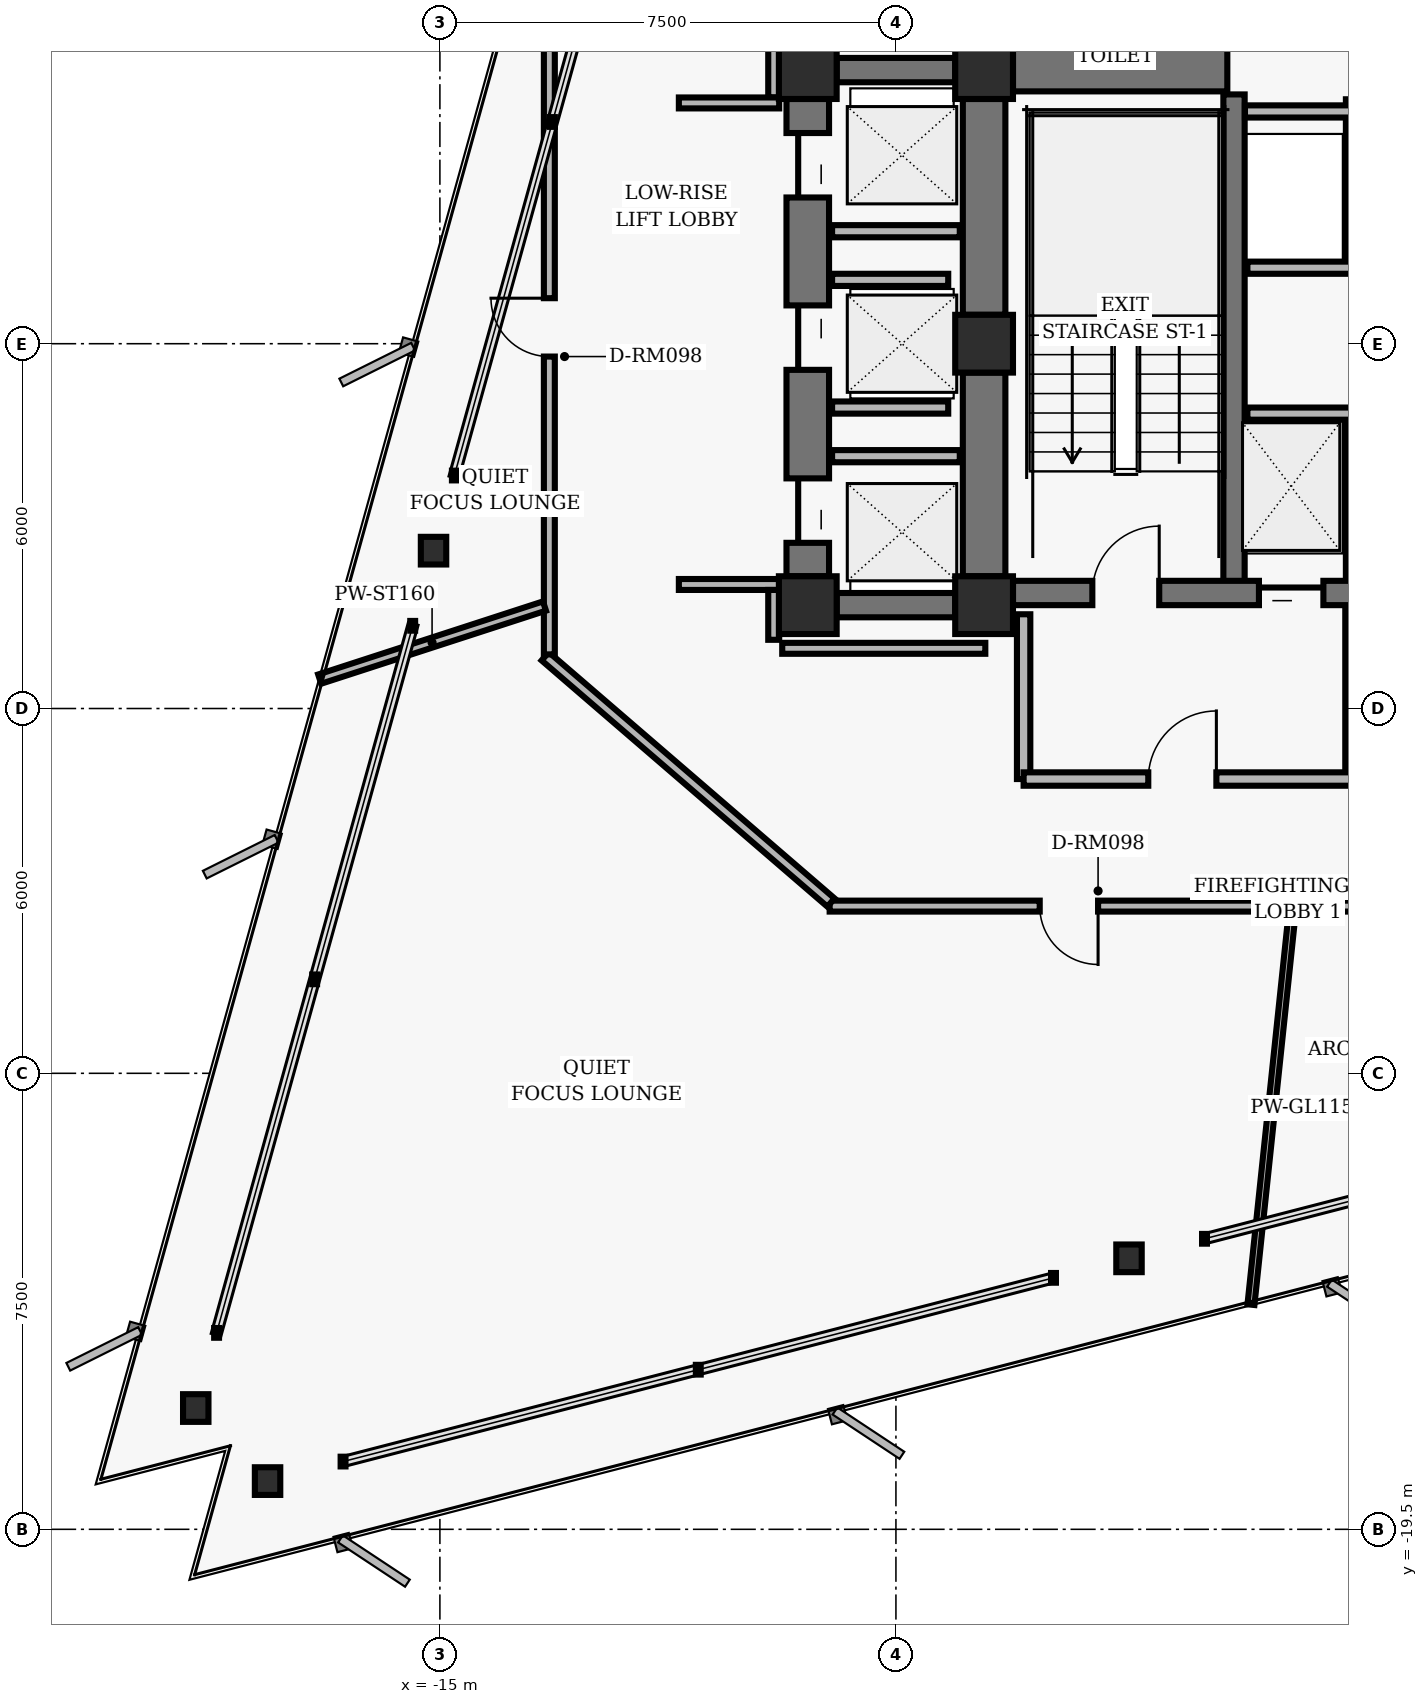
"""IFC4 building model, lengths in metres.
Left out: names, types, materials, properties, quantities, classifications, styles, units other than length and angle.
Written with IfcOpenShell. Run it as: python <this file> out.ifc"""

import sys

from ifc_helpers import new_model, si_unit, direction, frame, frame_2d, origin, origin_2d, place, context, subcontext, project, spatial, rectangle, hollow_rectangle, i_section, extrude, element, fill, save


model = new_model("IFC4")
c1 = context("Model", 3, precision=1e-05, world=origin(), true_north=direction((0.0, 1.0)))
c2 = subcontext(c1, "Body", "Model", "MODEL_VIEW")
j1 = project(units=[si_unit("LENGTHUNIT", "METRE"), si_unit("PLANEANGLEUNIT", "RADIAN")], contexts=[c1])
p1 = place(None, origin())
s1 = spatial("IfcSite", under=j1, at=p1, CompositionType="ELEMENT")
p2 = place(p1, origin())
s2 = spatial("IfcBuilding", under=s1, at=p2, CompositionType="ELEMENT")
p3 = place(p2, frame((0.0, 0.0, 85.6)))
s3 = spatial("IfcBuildingStorey", under=s2, at=p3, CompositionType="ELEMENT", Elevation=85.6)
for number, where, z_axis, x_axis in (
    (1, (-6.05, 4.5, 0.0), (0.0, 0.0, 1.0), (1.0, 0.0, 0.0)),
    (2, (-6.05, 0.0, 0.0), (0.0, 0.0, 1.0), (1.0, 0.0, 0.0)),
    (3, (-6.05, -4.3, 0.0), (0.0, 0.0, 1.0), (1.0, 0.0, 0.0)),
    (4, (-8.95, 4.5, 0.0), (0.0, 0.0, 1.0), (1.0, 0.0, 0.0)),
    (5, (-8.95, -4.3, 0.0), (0.0, 0.0, 1.0), (1.0, 0.0, 0.0)),
):
    element("IfcColumn", number, at=place(p3, frame(where, z_axis=z_axis, x_axis=x_axis)), inside=s3, PredefinedType="COLUMN", context=c2, shape_type="SweptSolid", body=[
        extrude(hollow_rectangle(XDim=0.95, YDim=0.95, WallThickness=0.06, InnerFilletRadius=0.02, OuterFilletRadius=0.04, at=origin_2d()), origin(), (0.0, 0.0, 1.0), 3.04),
    ])
p4 = place(p3, frame((-6.05, 0.475, 0.0), z_axis=(0.0, 0.0, 1.0), x_axis=(0.0, 1.0, 0.0)))
e6 = element("IfcWall", 6, at=p4, inside=s3, PredefinedType="SHEAR", context=c2, shape_type="SweptSolid", body=[
    extrude(rectangle(XDim=3.55, YDim=0.7, at=frame_2d((1.775, 0.0))), origin(), (0.0, 0.0, 1.0), 2.788),
])
p5 = place(p3, frame((-6.05, -3.825, 0.0), z_axis=(0.0, 0.0, 1.0), x_axis=(0.0, 1.0, 0.0)))
e7 = element("IfcWall", 7, at=p5, inside=s3, PredefinedType="SHEAR", context=c2, shape_type="SweptSolid", body=[
    extrude(rectangle(XDim=3.35, YDim=0.7, at=frame_2d((1.675, 0.0))), origin(), (0.0, 0.0, 1.0), 2.788),
])
p6 = place(p3, frame((-1.94, -4.1, 0.0), z_axis=(0.0, 0.0, 1.0), x_axis=(0.0, 1.0, 0.0)))
e8 = element("IfcWall", 8, at=p6, inside=s3, PredefinedType="SHEAR", context=c2, shape_type="SweptSolid", body=[
    extrude(rectangle(XDim=8.2, YDim=0.35, at=frame_2d((4.1, 0.0))), origin(), (0.0, 0.0, 1.0), 2.788),
])
p7 = place(p3, frame((-5.575, -4.1, 0.0), z_axis=(0.0, 0.0, 1.0), x_axis=(1.0, 0.0, 0.0)))
e9 = element("IfcWall", 9, at=p7, inside=s3, PredefinedType="SHEAR", context=c2, shape_type="SweptSolid", body=[
    extrude(rectangle(XDim=11.15, YDim=0.4, at=frame_2d((5.575, 0.0))), origin(), (0.0, 0.0, 1.0), 2.788),
])
p8 = place(p7, frame((1.305, 0.0, 0.0)))
e10 = element("IfcOpeningElement", 10, at=p8, cuts=e9, PredefinedType="OPENING", context=c2, shape_type="SweptSolid", body=[
    extrude(rectangle(XDim=1.1, YDim=2.04, at=frame_2d((0.55, 1.02))), frame((0.0, 0.21, 0.0), z_axis=(0.0, -1.0, 0.0), x_axis=(1.0, 0.0, 0.0)), (0.0, 0.0, 1.0), 0.42),
])
p9 = place(p7, frame((8.745, 0.0, 0.0)))
e11 = element("IfcOpeningElement", 11, at=p9, cuts=e9, PredefinedType="OPENING", context=c2, shape_type="SweptSolid", body=[
    extrude(rectangle(XDim=1.1, YDim=2.04, at=frame_2d((0.55, 1.02))), frame((0.0, 0.21, 0.0), z_axis=(0.0, -1.0, 0.0), x_axis=(1.0, 0.0, 0.0)), (0.0, 0.0, 1.0), 0.42),
])
p10 = place(p7, frame((4.045, 0.0, 0.0)))
e12 = element("IfcOpeningElement", 12, at=p10, cuts=e9, PredefinedType="OPENING", context=c2, shape_type="SweptSolid", body=[
    extrude(rectangle(XDim=1.06, YDim=2.04, at=frame_2d((0.53, 1.02))), frame((0.0, 0.21, 0.0), z_axis=(0.0, -1.0, 0.0), x_axis=(1.0, 0.0, 0.0)), (0.0, 0.0, 1.0), 0.42),
])
p11 = place(p7, frame((6.045, 0.0, 0.0)))
e13 = element("IfcOpeningElement", 13, at=p11, cuts=e9, PredefinedType="OPENING", context=c2, shape_type="SweptSolid", body=[
    extrude(rectangle(XDim=1.06, YDim=2.04, at=frame_2d((0.53, 1.02))), frame((0.0, 0.21, 0.0), z_axis=(0.0, -1.0, 0.0), x_axis=(1.0, 0.0, 0.0)), (0.0, 0.0, 1.0), 0.42),
])
p12 = place(p3, frame((-5.575, 4.5, 0.0), z_axis=(0.0, 0.0, 1.0), x_axis=(1.0, 0.0, 0.0)))
e14 = element("IfcWall", 14, at=p12, inside=s3, PredefinedType="SHEAR", context=c2, shape_type="SweptSolid", body=[
    extrude(rectangle(XDim=3.525, YDim=0.7, at=frame_2d((1.762, 0.0))), origin(), (0.0, 0.0, 1.0), 2.788),
])
p13 = place(p3, frame((-8.95, -3.825, 0.0), z_axis=(0.0, 0.0, 1.0), x_axis=(0.0, 1.0, 0.0)))
e15 = element("IfcWall", 15, at=p13, inside=s3, PredefinedType="SHEAR", context=c2, shape_type="SweptSolid", body=[
    extrude(rectangle(XDim=7.85, YDim=0.7, at=frame_2d((3.925, 0.0))), origin(), (0.0, 0.0, 1.0), 2.788),
])
p14 = place(p13, frame((0.55, 0.0, 0.0)))
e16 = element("IfcOpeningElement", 16, at=p14, cuts=e15, PredefinedType="OPENING", context=c2, shape_type="SweptSolid", body=[
    extrude(rectangle(XDim=1.06, YDim=2.04, at=frame_2d((0.53, 1.02))), frame((0.0, 0.36, 0.0), z_axis=(0.0, -1.0, 0.0), x_axis=(1.0, 0.0, 0.0)), (0.0, 0.0, 1.0), 0.72),
])
p15 = place(p13, frame((3.395, 0.0, 0.0)))
e17 = element("IfcOpeningElement", 17, at=p15, cuts=e15, PredefinedType="OPENING", context=c2, shape_type="SweptSolid", body=[
    extrude(rectangle(XDim=1.06, YDim=2.04, at=frame_2d((0.53, 1.02))), frame((0.0, 0.36, 0.0), z_axis=(0.0, -1.0, 0.0), x_axis=(1.0, 0.0, 0.0)), (0.0, 0.0, 1.0), 0.72),
])
p16 = place(p13, frame((6.23, 0.0, 0.0)))
e18 = element("IfcOpeningElement", 18, at=p16, cuts=e15, PredefinedType="OPENING", context=c2, shape_type="SweptSolid", body=[
    extrude(rectangle(XDim=1.06, YDim=2.04, at=frame_2d((0.53, 1.02))), frame((0.0, 0.36, 0.0), z_axis=(0.0, -1.0, 0.0), x_axis=(1.0, 0.0, 0.0)), (0.0, 0.0, 1.0), 0.72),
])
for number, where, z_axis, x_axis in (
    (19, (-8.475, 4.5, 0.0), (0.0, 0.0, 1.0), (1.0, 0.0, 0.0)),
    (20, (-8.475, -4.3, 0.0), (0.0, 0.0, 1.0), (1.0, 0.0, 0.0)),
):
    element("IfcWall", number, at=place(p3, frame(where, z_axis=z_axis, x_axis=x_axis)), inside=s3, PredefinedType="SHEAR", context=c2, shape_type="SweptSolid", body=[
        extrude(rectangle(XDim=1.95, YDim=0.4, at=frame_2d((0.975, 0.0))), origin(), (0.0, 0.0, 1.0), 2.788),
    ])
for number, where, z_axis, x_axis in (
    (21, (-15.104, -3.404, 0.0), (0.0, 0.0, 1.0), (1.0, 0.0, 0.0)),
    (22, (-19.015, -17.505, 0.0), (0.0, 0.0, 1.0), (1.0, 0.0, 0.0)),
    (23, (-17.834, -18.707, 0.0), (0.0, 0.0, 1.0), (1.0, 0.0, 0.0)),
    (24, (-3.667, -15.043, 0.0), (0.0, 0.0, 1.0), (1.0, 0.0, 0.0)),
):
    element("IfcColumn", number, at=place(p3, frame(where, z_axis=z_axis, x_axis=x_axis)), inside=s3, PredefinedType="COLUMN", context=c2, shape_type="SweptSolid", body=[
        extrude(i_section(OverallWidth=0.418, OverallDepth=0.455, WebThickness=0.042, FlangeThickness=0.068, FilletRadius=0.025, at=origin_2d()), origin(), (0.0, 0.0, 1.0), 3.04),
    ])
p17 = place(p3, frame((0.0, -3.82, 0.0), z_axis=(0.0, 0.0, 1.0), x_axis=(0.0, 1.0, 0.0)))
e25 = element("IfcWall", 25, at=p17, inside=s3, PredefinedType="PARTITIONING", context=c2, shape_type="SweptSolid", body=[
    extrude(rectangle(XDim=2.67, YDim=0.2, at=frame_2d((1.335, 0.0))), origin(), (0.0, 0.0, 1.0), 2.763),
])
p18 = place(p3, frame((-1.72, -1.15, 0.0), z_axis=(0.0, 0.0, 1.0), x_axis=(1.0, 0.0, 0.0)))
e26 = element("IfcWall", 26, at=p18, inside=s3, PredefinedType="PARTITIONING", context=c2, shape_type="SweptSolid", body=[
    extrude(rectangle(XDim=3.44, YDim=0.2, at=frame_2d((1.72, 0.0))), origin(), (0.0, 0.0, 1.0), 2.763),
])
p19 = place(p3, frame((-5.4, -7.16, 0.0), z_axis=(0.0, 0.0, 1.0), x_axis=(0.0, 1.0, 0.0)))
e27 = element("IfcWall", 27, at=p19, inside=s3, PredefinedType="PARTITIONING", context=c2, shape_type="SweptSolid", body=[
    extrude(rectangle(XDim=2.71, YDim=0.22, at=frame_2d((1.355, 0.0))), origin(), (0.0, 0.0, 1.0), 2.763),
])
p20 = place(p3, frame((0.0, -7.16, 0.0), z_axis=(0.0, 0.0, 1.0), x_axis=(0.0, 1.0, 0.0)))
e28 = element("IfcWall", 28, at=p20, inside=s3, PredefinedType="PARTITIONING", context=c2, shape_type="SweptSolid", body=[
    extrude(rectangle(XDim=2.81, YDim=0.22, at=frame_2d((1.405, 0.0))), origin(), (0.0, 0.0, 1.0), 2.763),
])
p21 = place(p3, frame((-5.4, -7.16, 0.0), z_axis=(0.0, 0.0, 1.0), x_axis=(1.0, 0.0, 0.0)))
e29 = element("IfcWall", 29, at=p21, inside=s3, PredefinedType="PARTITIONING", context=c2, shape_type="SweptSolid", body=[
    extrude(rectangle(XDim=5.4, YDim=0.22, at=frame_2d((2.7, 0.0))), origin(), (0.0, 0.0, 1.0), 2.763),
])
p22 = place(p21, frame((2.05, 0.0, 0.0)))
e30 = element("IfcOpeningElement", 30, at=p22, cuts=e29, PredefinedType="OPENING", context=c2, shape_type="SweptSolid", body=[
    extrude(rectangle(XDim=1.12, YDim=2.02, at=frame_2d((0.56, 1.01))), frame((0.0, 0.12, 0.0), z_axis=(0.0, -1.0, 0.0), x_axis=(1.0, 0.0, 0.0)), (0.0, 0.0, 1.0), 0.24),
])
p23 = place(p3, frame((0.0, 1.25, 0.0), z_axis=(0.0, 0.0, 1.0), x_axis=(0.0, 1.0, 0.0)))
e31 = element("IfcWall", 31, at=p23, inside=s3, PredefinedType="PARTITIONING", context=c2, shape_type="SweptSolid", body=[
    extrude(rectangle(XDim=2.77, YDim=0.2, at=frame_2d((1.385, 0.0))), origin(), (0.0, 0.0, 1.0), 2.763),
])
p24 = place(p3, frame((-1.72, 1.25, 0.0), z_axis=(0.0, 0.0, 1.0), x_axis=(1.0, 0.0, 0.0)))
e32 = element("IfcWall", 32, at=p24, inside=s3, PredefinedType="PARTITIONING", context=c2, shape_type="SweptSolid", body=[
    extrude(rectangle(XDim=3.44, YDim=0.2, at=frame_2d((1.72, 0.0))), origin(), (0.0, 0.0, 1.0), 2.763),
])
p25 = place(p3, frame((-1.76, 3.82, 0.0), z_axis=(0.0, 0.0, 1.0), x_axis=(1.0, 0.0, 0.0)))
e33 = element("IfcWall", 33, at=p25, inside=s3, PredefinedType="PARTITIONING", context=c2, shape_type="SweptSolid", body=[
    extrude(rectangle(XDim=3.52, YDim=0.2, at=frame_2d((1.76, 0.0))), origin(), (0.0, 0.0, 1.0), 2.763),
])
for number, where, z_axis, x_axis in (
    (34, (-8.55, -1.85, 0.0), (0.0, 0.0, 1.0), (1.0, 0.0, 0.0)),
    (35, (-8.55, 1.85, 0.0), (0.0, 0.0, 1.0), (1.0, 0.0, 0.0)),
):
    element("IfcWall", number, at=place(p3, frame(where, z_axis=z_axis, x_axis=x_axis)), inside=s3, PredefinedType="PARTITIONING", context=c2, shape_type="SweptSolid", body=[
        extrude(rectangle(XDim=2.1, YDim=0.2, at=frame_2d((1.05, 0.0))), origin(), (0.0, 0.0, 1.0), 2.763),
    ])
for number, where, z_axis, x_axis in (
    (36, (-8.55, -1.05, 0.0), (0.0, 0.0, 1.0), (1.0, 0.0, 0.0)),
    (37, (-8.55, 1.05, 0.0), (0.0, 0.0, 1.0), (1.0, 0.0, 0.0)),
):
    element("IfcWall", number, at=place(p3, frame(where, z_axis=z_axis, x_axis=x_axis)), inside=s3, PredefinedType="PARTITIONING", context=c2, shape_type="SweptSolid", body=[
        extrude(rectangle(XDim=1.91, YDim=0.2, at=frame_2d((0.955, 0.0))), origin(), (0.0, 0.0, 1.0), 2.763),
    ])
p26 = place(p3, frame((8.41, -9.25, 0.0), z_axis=(0.0, 0.0, 1.0), x_axis=(-1.0, 0.0, 0.0)))
e38 = element("IfcWall", 38, at=p26, inside=s3, PredefinedType="PARTITIONING", context=c2, shape_type="SweptSolid", body=[
    extrude(rectangle(XDim=17.0, YDim=0.18, at=frame_2d((8.5, 0.0))), origin(), (0.0, 0.0, 1.0), 2.277),
])
p27 = place(p26, frame((12.585, 0.0, 0.0)))
e39 = element("IfcOpeningElement", 39, at=p27, cuts=e38, PredefinedType="OPENING", context=c2, shape_type="SweptSolid", body=[
    extrude(rectangle(XDim=0.96, YDim=2.02, at=frame_2d((0.48, 1.01))), frame((0.0, 0.1, 0.0), z_axis=(0.0, -1.0, 0.0), x_axis=(1.0, 0.0, 0.0)), (0.0, 0.0, 1.0), 0.2),
])
p28 = place(p26, frame((4.345, 0.0, 0.0)))
e40 = element("IfcOpeningElement", 40, at=p28, cuts=e38, PredefinedType="OPENING", context=c2, shape_type="SweptSolid", body=[
    extrude(rectangle(XDim=0.96, YDim=2.02, at=frame_2d((0.48, 1.01))), frame((0.0, 0.1, 0.0), z_axis=(0.0, -1.0, 0.0), x_axis=(1.0, 0.0, 0.0)), (0.0, 0.0, 1.0), 0.2),
])
p29 = place(p3, frame((-8.568, -9.191, 0.0), z_axis=(0.0, 0.0, 1.0), x_axis=(-0.757556899173, 0.652769135694, 0.0)))
e41 = element("IfcWall", 41, at=p29, inside=s3, PredefinedType="PARTITIONING", context=c2, shape_type="SweptSolid", body=[
    extrude(rectangle(XDim=6.204, YDim=0.18, at=frame_2d((3.102, 0.0))), origin(), (0.0, 0.0, 1.0), 2.763),
])
p30 = place(p3, frame((-13.2, -5.11, 0.0), z_axis=(0.0, 0.0, 1.0), x_axis=(0.0, 1.0, 0.0)))
e42 = element("IfcWall", 42, at=p30, inside=s3, PredefinedType="PARTITIONING", context=c2, shape_type="SweptSolid", body=[
    extrude(rectangle(XDim=10.22, YDim=0.18, at=frame_2d((5.11, 0.0))), origin(), (0.0, 0.0, 1.0), 2.143),
])
p31 = place(p30, frame((4.899, 0.0, 0.0)))
e43 = element("IfcOpeningElement", 43, at=p31, cuts=e42, PredefinedType="OPENING", context=c2, shape_type="SweptSolid", body=[
    extrude(rectangle(XDim=0.96, YDim=2.02, at=frame_2d((0.48, 1.01))), frame((0.0, 0.1, 0.0), z_axis=(0.0, -1.0, 0.0), x_axis=(1.0, 0.0, 0.0)), (0.0, 0.0, 1.0), 0.2),
])
p32 = place(p3, frame((-9.51, 4.87, 0.0), z_axis=(0.0, 0.0, 1.0), x_axis=(0.0, -1.0, 0.0)))
e44 = element("IfcWall", 44, at=p32, inside=s3, PredefinedType="PARTITIONING", context=c2, shape_type="SweptSolid", body=[
    extrude(rectangle(XDim=0.82, YDim=0.18, at=frame_2d((0.41, 0.0))), origin(), (0.0, 0.0, 1.0), 2.277),
])
p33 = place(p3, frame((-9.42, 3.96, 0.0), z_axis=(0.0, 0.0, 1.0), x_axis=(-1.0, 0.0, 0.0)))
e45 = element("IfcWall", 45, at=p33, inside=s3, PredefinedType="PARTITIONING", context=c2, shape_type="SweptSolid", body=[
    extrude(rectangle(XDim=1.65, YDim=0.18, at=frame_2d((0.825, 0.0))), origin(), (0.0, 0.0, 1.0), 2.763),
])
p34 = place(p3, frame((-11.07, -3.96, 0.0), z_axis=(0.0, 0.0, 1.0), x_axis=(1.0, 0.0, 0.0)))
e46 = element("IfcWall", 46, at=p34, inside=s3, PredefinedType="PARTITIONING", context=c2, shape_type="SweptSolid", body=[
    extrude(rectangle(XDim=1.65, YDim=0.18, at=frame_2d((0.825, 0.0))), origin(), (0.0, 0.0, 1.0), 2.048),
])
p35 = place(p3, frame((-9.51, -4.05, 0.0), z_axis=(0.0, 0.0, 1.0), x_axis=(0.0, -1.0, 0.0)))
e47 = element("IfcWall", 47, at=p35, inside=s3, PredefinedType="PARTITIONING", context=c2, shape_type="SweptSolid", body=[
    extrude(rectangle(XDim=0.82, YDim=0.18, at=frame_2d((0.41, 0.0))), origin(), (0.0, 0.0, 1.0), 2.763),
])
p36 = place(p3, frame((-9.37, -5.01, 0.0), z_axis=(0.0, 0.0, 1.0), x_axis=(1.0, 0.0, 0.0)))
e48 = element("IfcWall", 48, at=p36, inside=s3, PredefinedType="PARTITIONING", context=c2, shape_type="SweptSolid", body=[
    extrude(rectangle(XDim=3.34, YDim=0.18, at=frame_2d((1.67, 0.0))), origin(), (0.0, 0.0, 1.0), 2.763),
])
p37 = place(p3, frame((-13.28, -4.315, 0.0), z_axis=(0.0, 0.0, 1.0), x_axis=(-0.951067292341, -0.308983827147, 0.0)))
e49 = element("IfcWall", 49, at=p37, inside=s3, PredefinedType="PARTITIONING", context=c2, shape_type="SweptSolid", body=[
    extrude(rectangle(XDim=3.887, YDim=0.16, at=frame_2d((1.944, 0.0))), origin(), (0.0, 0.0, 1.0), 2.763),
])
p38 = place(p3, frame((-0.981, -9.33, 0.0), z_axis=(0.0, 0.0, 1.0), x_axis=(-0.10451105245, -0.994523725165, 0.0)))
e50 = element("IfcWall", 50, at=p38, inside=s3, PredefinedType="MOVABLE", context=c2, shape_type="SweptSolid", body=[
    extrude(rectangle(XDim=6.51, YDim=0.115, at=frame_2d((3.255, 0.0))), origin(), (0.0, 0.0, 1.0), 2.763),
])
p39 = place(p8, origin())
e51 = element("IfcDoor", 51, at=p39, inside=s3, OperationType="SINGLE_SWING_RIGHT", PredefinedType="DOOR", context=c2, shape_type="SweptSolid", body=[
    extrude(rectangle(XDim=1.1, YDim=2.04, at=frame_2d((0.55, 1.02))), frame((0.0, 0.025, 0.0), z_axis=(0.0, -1.0, 0.0), x_axis=(1.0, 0.0, 0.0)), (0.0, 0.0, 1.0), 0.05),
])
fill(e10, e51)
p40 = place(p10, origin())
e52 = element("IfcDoor", 52, at=p40, inside=s3, OperationType="SLIDING_TO_LEFT", PredefinedType="DOOR", context=c2, shape_type="SweptSolid", body=[
    extrude(rectangle(XDim=1.06, YDim=2.04, at=frame_2d((0.53, 1.02))), frame((0.0, 0.025, 0.0), z_axis=(0.0, -1.0, 0.0), x_axis=(1.0, 0.0, 0.0)), (0.0, 0.0, 1.0), 0.05),
])
fill(e12, e52)
p41 = place(p22, origin())
e53 = element("IfcDoor", 53, at=p41, inside=s3, OperationType="SINGLE_SWING_RIGHT", PredefinedType="DOOR", context=c2, shape_type="SweptSolid", body=[
    extrude(rectangle(XDim=1.12, YDim=2.02, at=frame_2d((0.56, 1.01))), frame((0.0, 0.025, 0.0), z_axis=(0.0, -1.0, 0.0), x_axis=(1.0, 0.0, 0.0)), (0.0, 0.0, 1.0), 0.05),
])
fill(e30, e53)
p42 = place(p14, origin())
e54 = element("IfcDoor", 54, at=p42, inside=s3, OperationType="SLIDING_TO_LEFT", PredefinedType="DOOR", context=c2, shape_type="SweptSolid", body=[
    extrude(rectangle(XDim=1.06, YDim=2.04, at=frame_2d((0.53, 1.02))), frame((0.0, 0.025, 0.0), z_axis=(0.0, -1.0, 0.0), x_axis=(1.0, 0.0, 0.0)), (0.0, 0.0, 1.0), 0.05),
])
fill(e16, e54)
p43 = place(p15, origin())
e55 = element("IfcDoor", 55, at=p43, inside=s3, OperationType="SLIDING_TO_RIGHT", PredefinedType="DOOR", context=c2, shape_type="SweptSolid", body=[
    extrude(rectangle(XDim=1.06, YDim=2.04, at=frame_2d((0.53, 1.02))), frame((0.0, 0.025, 0.0), z_axis=(0.0, -1.0, 0.0), x_axis=(1.0, 0.0, 0.0)), (0.0, 0.0, 1.0), 0.05),
])
fill(e17, e55)
p44 = place(p16, origin())
e56 = element("IfcDoor", 56, at=p44, inside=s3, OperationType="SLIDING_TO_LEFT", PredefinedType="DOOR", context=c2, shape_type="SweptSolid", body=[
    extrude(rectangle(XDim=1.06, YDim=2.04, at=frame_2d((0.53, 1.02))), frame((0.0, 0.025, 0.0), z_axis=(0.0, -1.0, 0.0), x_axis=(1.0, 0.0, 0.0)), (0.0, 0.0, 1.0), 0.05),
])
fill(e18, e56)
p45 = place(p31, origin())
e57 = element("IfcDoor", 57, at=p45, inside=s3, OperationType="SINGLE_SWING_RIGHT", PredefinedType="DOOR", context=c2, shape_type="SweptSolid", body=[
    extrude(rectangle(XDim=0.96, YDim=2.02, at=frame_2d((0.48, 1.01))), frame((0.0, 0.025, 0.0), z_axis=(0.0, -1.0, 0.0), x_axis=(1.0, 0.0, 0.0)), (0.0, 0.0, 1.0), 0.05),
])
fill(e43, e57)
p46 = place(p27, origin())
e58 = element("IfcDoor", 58, at=p46, inside=s3, OperationType="SINGLE_SWING_LEFT", PredefinedType="DOOR", context=c2, shape_type="SweptSolid", body=[
    extrude(rectangle(XDim=0.96, YDim=2.02, at=frame_2d((0.48, 1.01))), frame((0.0, 0.025, 0.0), z_axis=(0.0, -1.0, 0.0), x_axis=(1.0, 0.0, 0.0)), (0.0, 0.0, 1.0), 0.05),
])
fill(e39, e58)
save(model, sys.argv[1])
